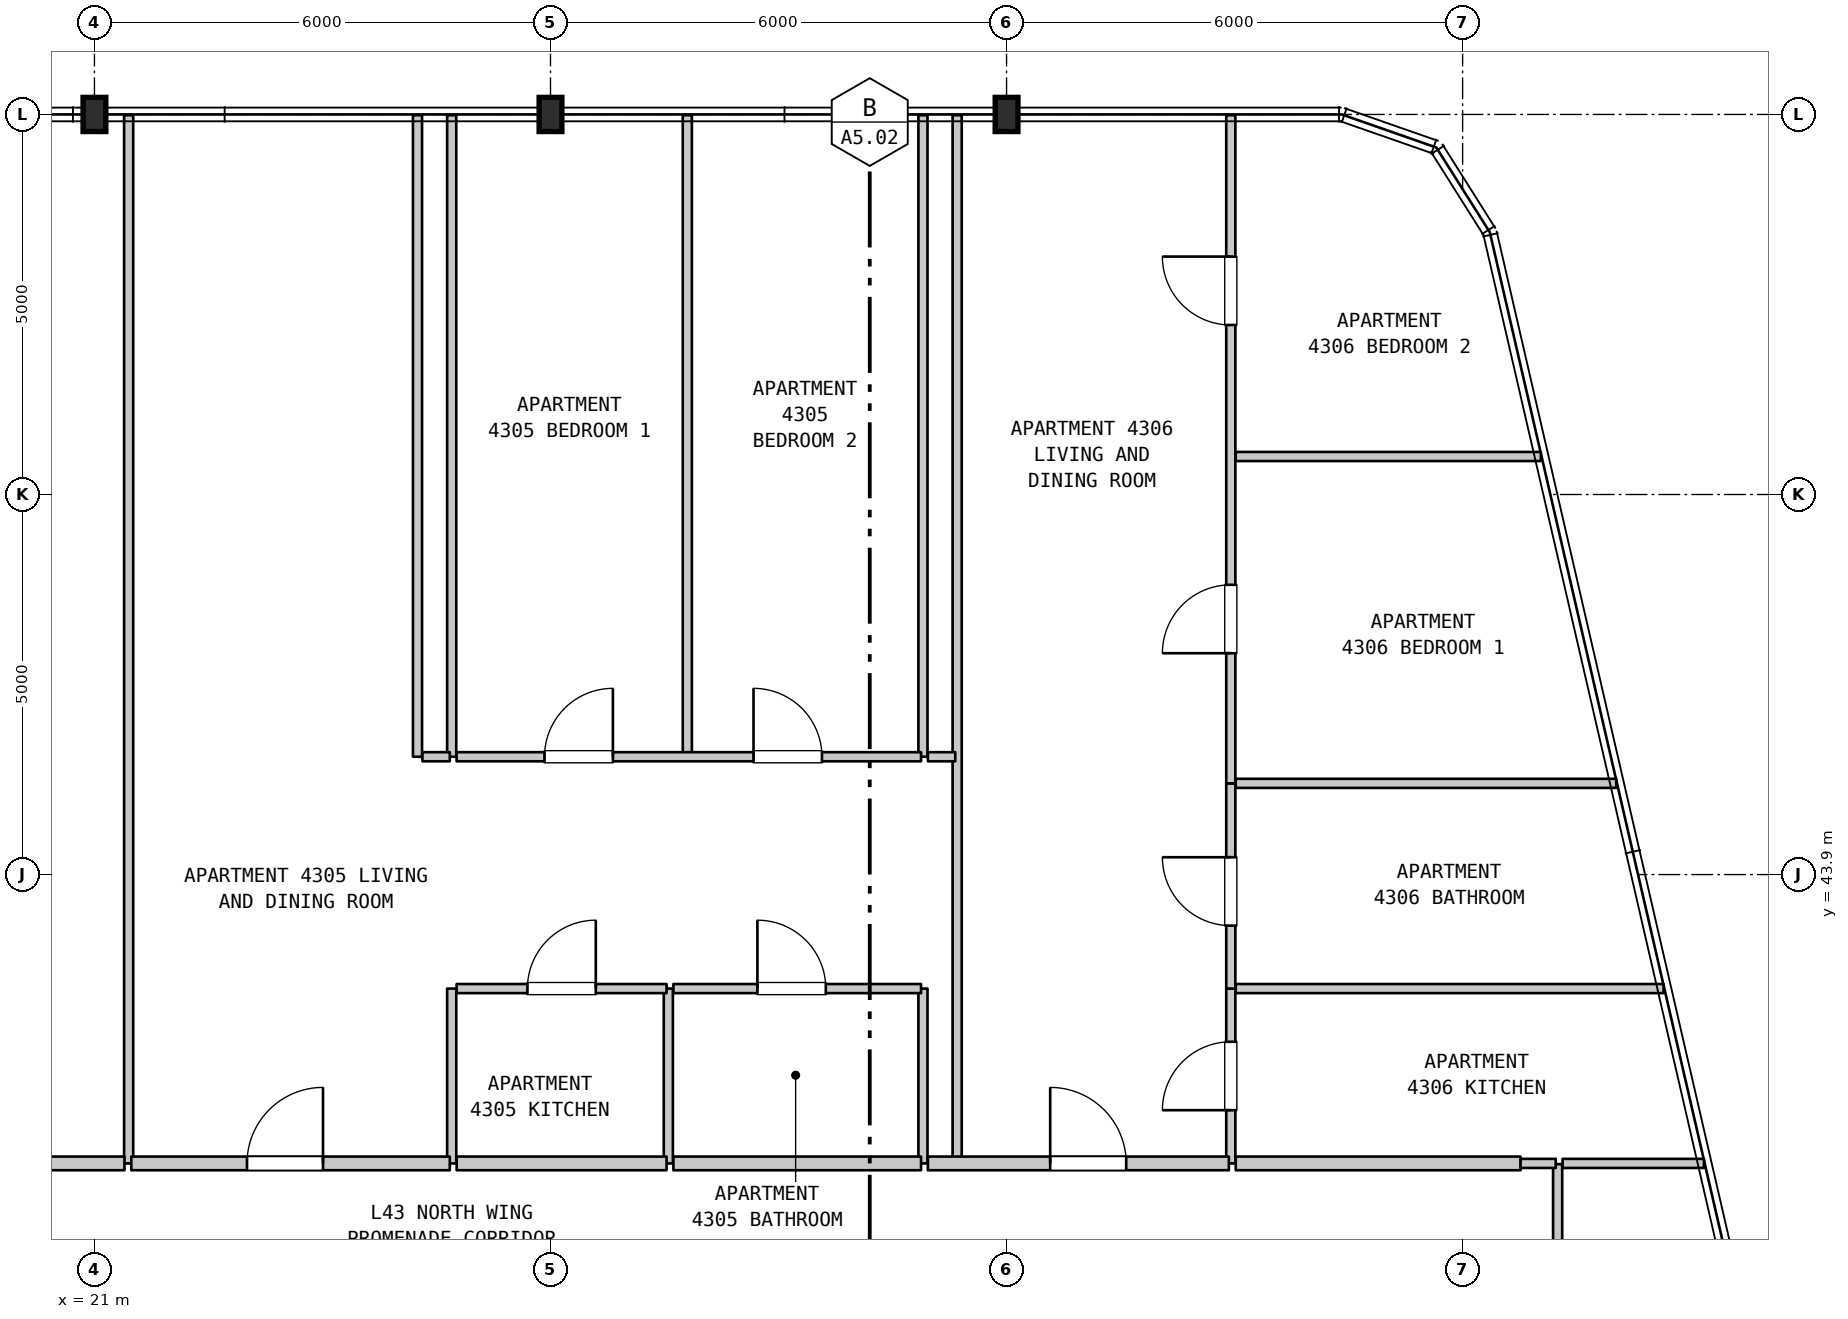
"""IFC4 building model, lengths in metres.
Left out: names, types, materials, properties, quantities, classifications, styles, units other than length and angle.
Written with IfcOpenShell. Run it as: python <this file> out.ifc"""

import sys

from ifc_helpers import new_model, si_unit, direction, frame, frame_2d, origin, origin_2d, place, context, subcontext, project, spatial, rectangle, i_section, extrude, element, fill, save


model = new_model("IFC4")
c1 = context("Model", 3, precision=1e-05, world=origin(), true_north=direction((0.0, 1.0)))
c2 = subcontext(c1, "Body", "Model", "MODEL_VIEW")
j1 = project(units=[si_unit("LENGTHUNIT", "METRE"), si_unit("PLANEANGLEUNIT", "RADIAN")], contexts=[c1])
p1 = place(None, origin())
s1 = spatial("IfcSite", under=j1, at=p1, CompositionType="ELEMENT")
p2 = place(p1, origin())
s2 = spatial("IfcBuilding", under=s1, at=p2, CompositionType="ELEMENT")
p3 = place(p2, frame((0.0, 0.0, 176.5)))
s3 = spatial("IfcBuildingStorey", under=s2, at=p3, CompositionType="ELEMENT", Elevation=176.5)
for number, where, z_axis, x_axis in (
    (1, (21.0, 53.9, 0.0), (0.0, 0.0, 1.0), (1.0, 0.0, 0.0)),
    (2, (27.0, 53.9, 0.0), (0.0, 0.0, 1.0), (1.0, 0.0, 0.0)),
    (3, (33.0, 53.9, 0.0), (0.0, 0.0, 1.0), (1.0, 0.0, 0.0)),
):
    element("IfcColumn", number, at=place(p3, frame(where, z_axis=z_axis, x_axis=x_axis)), inside=s3, PredefinedType="COLUMN", context=c2, shape_type="SweptSolid", body=[
        extrude(i_section(OverallWidth=0.3, OverallDepth=0.45, WebThickness=0.014, FlangeThickness=0.026, FilletRadius=0.027, at=origin_2d()), origin(), (0.0, 0.0, 1.0), 3.7),
    ])
p4 = place(p3, frame((21.45, 40.1, 0.0), z_axis=(0.0, 0.0, 1.0), x_axis=(0.0, 1.0, 0.0)))
e4 = element("IfcWall", 4, at=p4, inside=s3, PredefinedType="PARTITIONING", context=c2, shape_type="SweptSolid", body=[
    extrude(rectangle(XDim=13.79, YDim=0.12, at=frame_2d((6.895, 0.0))), origin(), (0.0, 0.0, 1.0), 3.39),
])
p5 = place(p3, frame((25.25, 45.45, 0.0), z_axis=(0.0, 0.0, 1.0), x_axis=(0.0, 1.0, 0.0)))
e5 = element("IfcWall", 5, at=p5, inside=s3, PredefinedType="PARTITIONING", context=c2, shape_type="SweptSolid", body=[
    extrude(rectangle(XDim=8.44, YDim=0.12, at=frame_2d((4.22, 0.0))), origin(), (0.0, 0.0, 1.0), 3.39),
])
p6 = place(p3, frame((25.7, 40.1, 0.0), z_axis=(0.0, 0.0, 1.0), x_axis=(0.0, 1.0, 0.0)))
e6 = element("IfcWall", 6, at=p6, inside=s3, PredefinedType="PARTITIONING", context=c2, shape_type="SweptSolid", body=[
    extrude(rectangle(XDim=2.3, YDim=0.12, at=frame_2d((1.15, 0.0))), origin(), (0.0, 0.0, 1.0), 3.39),
])
p7 = place(p3, frame((25.7, 45.45, 0.0), z_axis=(0.0, 0.0, 1.0), x_axis=(0.0, 1.0, 0.0)))
e7 = element("IfcWall", 7, at=p7, inside=s3, PredefinedType="PARTITIONING", context=c2, shape_type="SweptSolid", body=[
    extrude(rectangle(XDim=8.44, YDim=0.12, at=frame_2d((4.22, 0.0))), origin(), (0.0, 0.0, 1.0), 3.39),
])
p8 = place(p3, frame((28.55, 40.1, 0.0), z_axis=(0.0, 0.0, 1.0), x_axis=(0.0, 1.0, 0.0)))
e8 = element("IfcWall", 8, at=p8, inside=s3, PredefinedType="PARTITIONING", context=c2, shape_type="SweptSolid", body=[
    extrude(rectangle(XDim=2.3, YDim=0.12, at=frame_2d((1.15, 0.0))), origin(), (0.0, 0.0, 1.0), 3.39),
])
p9 = place(p3, frame((28.8, 45.45, 0.0), z_axis=(0.0, 0.0, 1.0), x_axis=(0.0, 1.0, 0.0)))
e9 = element("IfcWall", 9, at=p9, inside=s3, PredefinedType="PARTITIONING", context=c2, shape_type="SweptSolid", body=[
    extrude(rectangle(XDim=8.44, YDim=0.12, at=frame_2d((4.22, 0.0))), origin(), (0.0, 0.0, 1.0), 3.39),
])
p10 = place(p3, frame((31.9, 40.1, 0.0), z_axis=(0.0, 0.0, 1.0), x_axis=(0.0, 1.0, 0.0)))
e10 = element("IfcWall", 10, at=p10, inside=s3, PredefinedType="PARTITIONING", context=c2, shape_type="SweptSolid", body=[
    extrude(rectangle(XDim=2.3, YDim=0.12, at=frame_2d((1.15, 0.0))), origin(), (0.0, 0.0, 1.0), 3.39),
])
p11 = place(p3, frame((31.9, 45.45, 0.0), z_axis=(0.0, 0.0, 1.0), x_axis=(0.0, 1.0, 0.0)))
e11 = element("IfcWall", 11, at=p11, inside=s3, PredefinedType="PARTITIONING", context=c2, shape_type="SweptSolid", body=[
    extrude(rectangle(XDim=8.44, YDim=0.12, at=frame_2d((4.22, 0.0))), origin(), (0.0, 0.0, 1.0), 3.39),
])
p12 = place(p3, frame((32.35, 40.1, 0.0), z_axis=(0.0, 0.0, 1.0), x_axis=(0.0, 1.0, 0.0)))
e12 = element("IfcWall", 12, at=p12, inside=s3, PredefinedType="PARTITIONING", context=c2, shape_type="SweptSolid", body=[
    extrude(rectangle(XDim=13.79, YDim=0.12, at=frame_2d((6.895, 0.0))), origin(), (0.0, 0.0, 1.0), 3.39),
])
p13 = place(p3, frame((35.95, 40.1, 0.0), z_axis=(0.0, 0.0, 1.0), x_axis=(0.0, 1.0, 0.0)))
e13 = element("IfcWall", 13, at=p13, inside=s3, PredefinedType="PARTITIONING", context=c2, shape_type="SweptSolid", body=[
    extrude(rectangle(XDim=2.3, YDim=0.12, at=frame_2d((1.15, 0.0))), origin(), (0.0, 0.0, 1.0), 3.39),
])
p14 = place(p13, frame((0.7, 0.0, 0.0)))
e14 = element("IfcOpeningElement", 14, at=p14, cuts=e13, PredefinedType="OPENING", context=c2, shape_type="SweptSolid", body=[
    extrude(rectangle(XDim=0.9, YDim=2.15, at=frame_2d((0.45, 1.075))), frame((0.0, 0.07, 0.0), z_axis=(0.0, -1.0, 0.0), x_axis=(1.0, 0.0, 0.0)), (0.0, 0.0, 1.0), 0.14),
])
p15 = place(p3, frame((35.95, 42.4, 0.0), z_axis=(0.0, 0.0, 1.0), x_axis=(0.0, 1.0, 0.0)))
e15 = element("IfcWall", 15, at=p15, inside=s3, PredefinedType="PARTITIONING", context=c2, shape_type="SweptSolid", body=[
    extrude(rectangle(XDim=2.7, YDim=0.12, at=frame_2d((1.35, 0.0))), origin(), (0.0, 0.0, 1.0), 3.39),
])
p16 = place(p15, frame((0.828, 0.0, 0.0)))
e16 = element("IfcOpeningElement", 16, at=p16, cuts=e15, PredefinedType="OPENING", context=c2, shape_type="SweptSolid", body=[
    extrude(rectangle(XDim=0.9, YDim=2.1, at=frame_2d((0.45, 1.05))), frame((0.0, 0.07, 0.0), z_axis=(0.0, -1.0, 0.0), x_axis=(1.0, 0.0, 0.0)), (0.0, 0.0, 1.0), 0.14),
])
p17 = place(p3, frame((35.95, 45.1, 0.0), z_axis=(0.0, 0.0, 1.0), x_axis=(0.0, 1.0, 0.0)))
e17 = element("IfcWall", 17, at=p17, inside=s3, PredefinedType="PARTITIONING", context=c2, shape_type="SweptSolid", body=[
    extrude(rectangle(XDim=8.79, YDim=0.12, at=frame_2d((4.395, 0.0))), origin(), (0.0, 0.0, 1.0), 3.39),
])
p18 = place(p17, frame((1.712, 0.0, 0.0)))
e18 = element("IfcOpeningElement", 18, at=p18, cuts=e17, PredefinedType="OPENING", context=c2, shape_type="SweptSolid", body=[
    extrude(rectangle(XDim=0.9, YDim=2.15, at=frame_2d((0.45, 1.075))), frame((0.0, 0.07, 0.0), z_axis=(0.0, -1.0, 0.0), x_axis=(1.0, 0.0, 0.0)), (0.0, 0.0, 1.0), 0.14),
])
p19 = place(p17, frame((6.03, 0.0, 0.0)))
e19 = element("IfcOpeningElement", 19, at=p19, cuts=e17, PredefinedType="OPENING", context=c2, shape_type="SweptSolid", body=[
    extrude(rectangle(XDim=0.9, YDim=2.15, at=frame_2d((0.45, 1.075))), frame((0.0, 0.07, 0.0), z_axis=(0.0, -1.0, 0.0), x_axis=(1.0, 0.0, 0.0)), (0.0, 0.0, 1.0), 0.14),
])
p20 = place(p3, frame((40.25, 37.949, 0.0), z_axis=(0.0, 0.0, 1.0), x_axis=(0.0, 1.0, 0.0)))
e20 = element("IfcWall", 20, at=p20, inside=s3, PredefinedType="PARTITIONING", context=c2, shape_type="SweptSolid", body=[
    extrude(rectangle(XDim=2.141, YDim=0.12, at=frame_2d((1.071, 0.0))), origin(), (0.0, 0.0, 1.0), 3.39),
])
p21 = place(p3, frame((18.985, 40.1, 0.0), z_axis=(0.0, 0.0, 1.0), x_axis=(1.0, 0.0, 0.0)))
e21 = element("IfcWall", 21, at=p21, inside=s3, PredefinedType="STANDARD", context=c2, shape_type="SweptSolid", body=[
    extrude(rectangle(XDim=2.41, YDim=0.18, at=frame_2d((1.205, 0.0))), origin(), (0.0, 0.0, 1.0), 3.39),
])
p22 = place(p3, frame((21.485, 40.1, 0.0), z_axis=(0.0, 0.0, 1.0), x_axis=(1.0, 0.0, 0.0)))
e22 = element("IfcWall", 22, at=p22, inside=s3, PredefinedType="STANDARD", context=c2, shape_type="SweptSolid", body=[
    extrude(rectangle(XDim=4.19, YDim=0.18, at=frame_2d((2.095, 0.0))), origin(), (0.0, 0.0, 1.0), 3.39),
])
p23 = place(p22, frame((1.522, 0.0, 0.0)))
e23 = element("IfcOpeningElement", 23, at=p23, cuts=e22, PredefinedType="OPENING", context=c2, shape_type="SweptSolid", body=[
    extrude(rectangle(XDim=1.0, YDim=2.15, at=frame_2d((0.5, 1.075))), frame((0.0, 0.1, 0.0), z_axis=(0.0, -1.0, 0.0), x_axis=(1.0, 0.0, 0.0)), (0.0, 0.0, 1.0), 0.2),
])
p24 = place(p3, frame((25.765, 40.1, 0.0), z_axis=(0.0, 0.0, 1.0), x_axis=(1.0, 0.0, 0.0)))
e24 = element("IfcWall", 24, at=p24, inside=s3, PredefinedType="STANDARD", context=c2, shape_type="SweptSolid", body=[
    extrude(rectangle(XDim=2.762, YDim=0.18, at=frame_2d((1.381, 0.0))), origin(), (0.0, 0.0, 1.0), 3.39),
])
p25 = place(p3, frame((28.617, 40.1, 0.0), z_axis=(0.0, 0.0, 1.0), x_axis=(1.0, 0.0, 0.0)))
e25 = element("IfcWall", 25, at=p25, inside=s3, PredefinedType="STANDARD", context=c2, shape_type="SweptSolid", body=[
    extrude(rectangle(XDim=3.258, YDim=0.18, at=frame_2d((1.629, 0.0))), origin(), (0.0, 0.0, 1.0), 3.39),
])
p26 = place(p3, frame((31.965, 40.1, 0.0), z_axis=(0.0, 0.0, 1.0), x_axis=(1.0, 0.0, 0.0)))
e26 = element("IfcWall", 26, at=p26, inside=s3, PredefinedType="STANDARD", context=c2, shape_type="SweptSolid", body=[
    extrude(rectangle(XDim=3.96, YDim=0.18, at=frame_2d((1.98, 0.0))), origin(), (0.0, 0.0, 1.0), 3.39),
])
p27 = place(p26, frame((1.609, 0.0, 0.0)))
e27 = element("IfcOpeningElement", 27, at=p27, cuts=e26, PredefinedType="OPENING", context=c2, shape_type="SweptSolid", body=[
    extrude(rectangle(XDim=1.0, YDim=2.15, at=frame_2d((0.5, 1.075))), frame((0.0, 0.1, 0.0), z_axis=(0.0, -1.0, 0.0), x_axis=(1.0, 0.0, 0.0)), (0.0, 0.0, 1.0), 0.2),
])
p28 = place(p3, frame((36.015, 40.1, 0.0), z_axis=(0.0, 0.0, 1.0), x_axis=(1.0, 0.0, 0.0)))
e28 = element("IfcWall", 28, at=p28, inside=s3, PredefinedType="STANDARD", context=c2, shape_type="SweptSolid", body=[
    extrude(rectangle(XDim=3.748, YDim=0.18, at=frame_2d((1.874, 0.0))), origin(), (0.0, 0.0, 1.0), 3.39),
])
p29 = place(p3, frame((39.763, 40.1, 0.0), z_axis=(0.0, 0.0, 1.0), x_axis=(1.0, 0.0, 0.0)))
e29 = element("IfcWall", 29, at=p29, inside=s3, PredefinedType="PARTITIONING", context=c2, shape_type="SweptSolid", body=[
    extrude(rectangle(XDim=0.462, YDim=0.12, at=frame_2d((0.231, 0.0))), origin(), (0.0, 0.0, 1.0), 3.39),
])
p30 = place(p3, frame((40.315, 40.1, 0.0), z_axis=(0.0, 0.0, 1.0), x_axis=(1.0, 0.0, 0.0)))
e30 = element("IfcWall", 30, at=p30, inside=s3, PredefinedType="PARTITIONING", context=c2, shape_type="SweptSolid", body=[
    extrude(rectangle(XDim=1.86, YDim=0.12, at=frame_2d((0.93, 0.0))), origin(), (0.0, 0.0, 1.0), 3.39),
])
p31 = place(p3, frame((25.765, 42.4, 0.0), z_axis=(0.0, 0.0, 1.0), x_axis=(1.0, 0.0, 0.0)))
e31 = element("IfcWall", 31, at=p31, inside=s3, PredefinedType="PARTITIONING", context=c2, shape_type="SweptSolid", body=[
    extrude(rectangle(XDim=2.762, YDim=0.12, at=frame_2d((1.381, 0.0))), origin(), (0.0, 0.0, 1.0), 3.39),
])
p32 = place(p31, frame((0.931, 0.0, 0.0)))
e32 = element("IfcOpeningElement", 32, at=p32, cuts=e31, PredefinedType="OPENING", context=c2, shape_type="SweptSolid", body=[
    extrude(rectangle(XDim=0.9, YDim=2.15, at=frame_2d((0.45, 1.075))), frame((0.0, 0.07, 0.0), z_axis=(0.0, -1.0, 0.0), x_axis=(1.0, 0.0, 0.0)), (0.0, 0.0, 1.0), 0.14),
])
p33 = place(p3, frame((28.617, 42.4, 0.0), z_axis=(0.0, 0.0, 1.0), x_axis=(1.0, 0.0, 0.0)))
e33 = element("IfcWall", 33, at=p33, inside=s3, PredefinedType="PARTITIONING", context=c2, shape_type="SweptSolid", body=[
    extrude(rectangle(XDim=3.258, YDim=0.12, at=frame_2d((1.629, 0.0))), origin(), (0.0, 0.0, 1.0), 3.39),
])
p34 = place(p33, frame((1.105, 0.0, 0.0)))
e34 = element("IfcOpeningElement", 34, at=p34, cuts=e33, PredefinedType="OPENING", context=c2, shape_type="SweptSolid", body=[
    extrude(rectangle(XDim=0.9, YDim=2.1, at=frame_2d((0.45, 1.05))), frame((0.0, 0.07, 0.0), z_axis=(0.0, -1.0, 0.0), x_axis=(1.0, 0.0, 0.0)), (0.0, 0.0, 1.0), 0.14),
])
p35 = place(p3, frame((36.015, 42.4, 0.0), z_axis=(0.0, 0.0, 1.0), x_axis=(1.0, 0.0, 0.0)))
e35 = element("IfcWall", 35, at=p35, inside=s3, PredefinedType="PARTITIONING", context=c2, shape_type="SweptSolid", body=[
    extrude(rectangle(XDim=5.629, YDim=0.12, at=frame_2d((2.814, 0.0))), origin(), (0.0, 0.0, 1.0), 3.39),
])
p36 = place(p3, frame((36.015, 45.1, 0.0), z_axis=(0.0, 0.0, 1.0), x_axis=(1.0, 0.0, 0.0)))
e36 = element("IfcWall", 36, at=p36, inside=s3, PredefinedType="PARTITIONING", context=c2, shape_type="SweptSolid", body=[
    extrude(rectangle(XDim=5.006, YDim=0.12, at=frame_2d((2.503, 0.0))), origin(), (0.0, 0.0, 1.0), 3.39),
])
p37 = place(p3, frame((25.315, 45.45, 0.0), z_axis=(0.0, 0.0, 1.0), x_axis=(1.0, 0.0, 0.0)))
e37 = element("IfcWall", 37, at=p37, inside=s3, PredefinedType="PARTITIONING", context=c2, shape_type="SweptSolid", body=[
    extrude(rectangle(XDim=0.36, YDim=0.12, at=frame_2d((0.18, 0.0))), origin(), (0.0, 0.0, 1.0), 3.39),
])
p38 = place(p3, frame((25.765, 45.45, 0.0), z_axis=(0.0, 0.0, 1.0), x_axis=(1.0, 0.0, 0.0)))
e38 = element("IfcWall", 38, at=p38, inside=s3, PredefinedType="PARTITIONING", context=c2, shape_type="SweptSolid", body=[
    extrude(rectangle(XDim=6.11, YDim=0.12, at=frame_2d((3.055, 0.0))), origin(), (0.0, 0.0, 1.0), 3.39),
])
p39 = place(p38, frame((1.156, 0.0, 0.0)))
e39 = element("IfcOpeningElement", 39, at=p39, cuts=e38, PredefinedType="OPENING", context=c2, shape_type="SweptSolid", body=[
    extrude(rectangle(XDim=0.9, YDim=2.15, at=frame_2d((0.45, 1.075))), frame((0.0, 0.07, 0.0), z_axis=(0.0, -1.0, 0.0), x_axis=(1.0, 0.0, 0.0)), (0.0, 0.0, 1.0), 0.14),
])
p40 = place(p38, frame((3.906, 0.0, 0.0)))
e40 = element("IfcOpeningElement", 40, at=p40, cuts=e38, PredefinedType="OPENING", context=c2, shape_type="SweptSolid", body=[
    extrude(rectangle(XDim=0.9, YDim=2.15, at=frame_2d((0.45, 1.075))), frame((0.0, 0.07, 0.0), z_axis=(0.0, -1.0, 0.0), x_axis=(1.0, 0.0, 0.0)), (0.0, 0.0, 1.0), 0.14),
])
p41 = place(p3, frame((31.965, 45.45, 0.0), z_axis=(0.0, 0.0, 1.0), x_axis=(1.0, 0.0, 0.0)))
e41 = element("IfcWall", 41, at=p41, inside=s3, PredefinedType="PARTITIONING", context=c2, shape_type="SweptSolid", body=[
    extrude(rectangle(XDim=0.36, YDim=0.12, at=frame_2d((0.18, 0.0))), origin(), (0.0, 0.0, 1.0), 3.39),
])
p42 = place(p3, frame((36.015, 49.4, 0.0), z_axis=(0.0, 0.0, 1.0), x_axis=(1.0, 0.0, 0.0)))
e42 = element("IfcWall", 42, at=p42, inside=s3, PredefinedType="PARTITIONING", context=c2, shape_type="SweptSolid", body=[
    extrude(rectangle(XDim=4.014, YDim=0.12, at=frame_2d((2.007, 0.0))), origin(), (0.0, 0.0, 1.0), 3.39),
])
p43 = place(p14, origin())
e43 = element("IfcDoor", 43, at=p43, inside=s3, OperationType="SINGLE_SWING_LEFT", PredefinedType="DOOR", context=c2, shape_type="SweptSolid", body=[
    extrude(rectangle(XDim=0.9, YDim=2.15, at=frame_2d((0.45, 1.075))), frame((0.0, 0.025, 0.0), z_axis=(0.0, -1.0, 0.0), x_axis=(1.0, 0.0, 0.0)), (0.0, 0.0, 1.0), 0.05),
])
fill(e14, e43)
p44 = place(p16, origin())
e44 = element("IfcDoor", 44, at=p44, inside=s3, OperationType="SINGLE_SWING_RIGHT", PredefinedType="DOOR", context=c2, shape_type="SweptSolid", body=[
    extrude(rectangle(XDim=0.9, YDim=2.1, at=frame_2d((0.45, 1.05))), frame((0.0, 0.025, 0.0), z_axis=(0.0, -1.0, 0.0), x_axis=(1.0, 0.0, 0.0)), (0.0, 0.0, 1.0), 0.05),
])
fill(e16, e44)
p45 = place(p18, origin())
e45 = element("IfcDoor", 45, at=p45, inside=s3, OperationType="SINGLE_SWING_LEFT", PredefinedType="DOOR", context=c2, shape_type="SweptSolid", body=[
    extrude(rectangle(XDim=0.9, YDim=2.15, at=frame_2d((0.45, 1.075))), frame((0.0, 0.025, 0.0), z_axis=(0.0, -1.0, 0.0), x_axis=(1.0, 0.0, 0.0)), (0.0, 0.0, 1.0), 0.05),
])
fill(e18, e45)
p46 = place(p19, origin())
e46 = element("IfcDoor", 46, at=p46, inside=s3, OperationType="SINGLE_SWING_RIGHT", PredefinedType="DOOR", context=c2, shape_type="SweptSolid", body=[
    extrude(rectangle(XDim=0.9, YDim=2.15, at=frame_2d((0.45, 1.075))), frame((0.0, 0.025, 0.0), z_axis=(0.0, -1.0, 0.0), x_axis=(1.0, 0.0, 0.0)), (0.0, 0.0, 1.0), 0.05),
])
fill(e19, e46)
p47 = place(p23, origin())
e47 = element("IfcDoor", 47, at=p47, inside=s3, OperationType="SINGLE_SWING_RIGHT", PredefinedType="DOOR", context=c2, shape_type="SweptSolid", body=[
    extrude(rectangle(XDim=1.0, YDim=2.15, at=frame_2d((0.5, 1.075))), frame((0.0, 0.025, 0.0), z_axis=(0.0, -1.0, 0.0), x_axis=(1.0, 0.0, 0.0)), (0.0, 0.0, 1.0), 0.05),
])
fill(e23, e47)
p48 = place(p27, origin())
e48 = element("IfcDoor", 48, at=p48, inside=s3, OperationType="SINGLE_SWING_LEFT", PredefinedType="DOOR", context=c2, shape_type="SweptSolid", body=[
    extrude(rectangle(XDim=1.0, YDim=2.15, at=frame_2d((0.5, 1.075))), frame((0.0, 0.025, 0.0), z_axis=(0.0, -1.0, 0.0), x_axis=(1.0, 0.0, 0.0)), (0.0, 0.0, 1.0), 0.05),
])
fill(e27, e48)
p49 = place(p32, origin())
e49 = element("IfcDoor", 49, at=p49, inside=s3, OperationType="SINGLE_SWING_RIGHT", PredefinedType="DOOR", context=c2, shape_type="SweptSolid", body=[
    extrude(rectangle(XDim=0.9, YDim=2.15, at=frame_2d((0.45, 1.075))), frame((0.0, 0.025, 0.0), z_axis=(0.0, -1.0, 0.0), x_axis=(1.0, 0.0, 0.0)), (0.0, 0.0, 1.0), 0.05),
])
fill(e32, e49)
p50 = place(p34, origin())
e50 = element("IfcDoor", 50, at=p50, inside=s3, OperationType="SINGLE_SWING_LEFT", PredefinedType="DOOR", context=c2, shape_type="SweptSolid", body=[
    extrude(rectangle(XDim=0.9, YDim=2.1, at=frame_2d((0.45, 1.05))), frame((0.0, 0.025, 0.0), z_axis=(0.0, -1.0, 0.0), x_axis=(1.0, 0.0, 0.0)), (0.0, 0.0, 1.0), 0.05),
])
fill(e34, e50)
p51 = place(p39, origin())
e51 = element("IfcDoor", 51, at=p51, inside=s3, OperationType="SINGLE_SWING_RIGHT", PredefinedType="DOOR", context=c2, shape_type="SweptSolid", body=[
    extrude(rectangle(XDim=0.9, YDim=2.15, at=frame_2d((0.45, 1.075))), frame((0.0, 0.025, 0.0), z_axis=(0.0, -1.0, 0.0), x_axis=(1.0, 0.0, 0.0)), (0.0, 0.0, 1.0), 0.05),
])
fill(e39, e51)
p52 = place(p40, origin())
e52 = element("IfcDoor", 52, at=p52, inside=s3, OperationType="SINGLE_SWING_LEFT", PredefinedType="DOOR", context=c2, shape_type="SweptSolid", body=[
    extrude(rectangle(XDim=0.9, YDim=2.15, at=frame_2d((0.45, 1.075))), frame((0.0, 0.025, 0.0), z_axis=(0.0, -1.0, 0.0), x_axis=(1.0, 0.0, 0.0)), (0.0, 0.0, 1.0), 0.05),
])
fill(e40, e52)
save(model, sys.argv[1])
